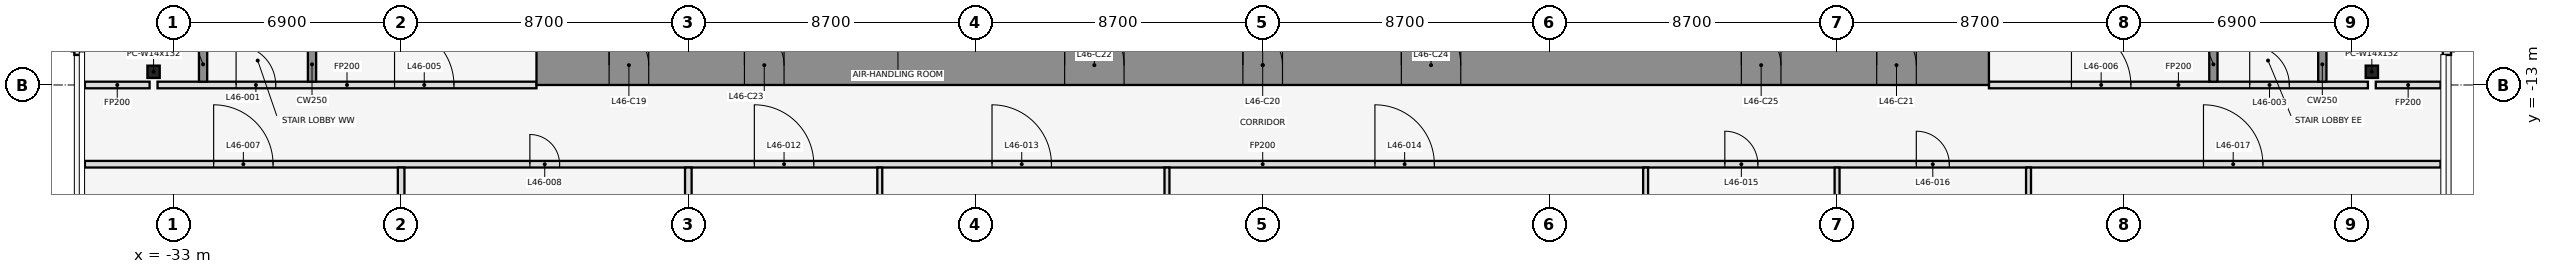
"""IFC4 building model, lengths in metres.
Left out: names, types, materials, properties, quantities, classifications, styles, units other than length and angle.
Written with IfcOpenShell. Run it as: python <this file> out.ifc"""

import sys

from ifc_helpers import new_model, si_unit, direction, frame, frame_2d, origin, origin_2d, place, context, subcontext, project, spatial, rectangle, i_section, extrude, element, fill, save


model = new_model("IFC4")
c1 = context("Model", 3, precision=1e-05, world=origin(), true_north=direction((0.0, 1.0)))
c2 = subcontext(c1, "Body", "Model", "MODEL_VIEW")
j1 = project(units=[si_unit("LENGTHUNIT", "METRE"), si_unit("PLANEANGLEUNIT", "RADIAN")], contexts=[c1])
p1 = place(None, origin())
s1 = spatial("IfcSite", under=j1, at=p1, CompositionType="ELEMENT")
p2 = place(p1, origin())
s2 = spatial("IfcBuilding", under=s1, at=p2, CompositionType="ELEMENT")
p3 = place(p2, frame((0.0, 0.0, 207.3)))
s3 = spatial("IfcBuildingStorey", under=s2, at=p3, CompositionType="ELEMENT", Elevation=207.3)
for number, where, z_axis, x_axis in (
    (1, (-33.6, -12.6, 0.0), (0.0, 0.0, 1.0), (1.0, 0.0, 0.0)),
    (2, (33.6, -12.6, 0.0), (0.0, 0.0, 1.0), (1.0, 0.0, 0.0)),
):
    element("IfcColumn", number, at=place(p3, frame(where, z_axis=z_axis, x_axis=x_axis)), inside=s3, PredefinedType="COLUMN", context=c2, shape_type="SweptSolid", body=[
        extrude(i_section(OverallWidth=0.373, OverallDepth=0.373, WebThickness=0.016, FlangeThickness=0.026, at=origin_2d()), origin(), (0.0, 0.0, 1.0), 4.1),
    ])
for number, where, z_axis, x_axis in (
    (3, (-35.875, -3.0, 0.0), (0.0, 0.0, 1.0), (0.0, -1.0, 0.0)),
    (4, (35.875, -12.09, 0.0), (0.0, 0.0, 1.0), (0.0, 1.0, 0.0)),
):
    element("IfcWall", number, at=place(p3, frame(where, z_axis=z_axis, x_axis=x_axis)), inside=s3, PredefinedType="STANDARD", context=c2, shape_type="SweptSolid", body=[
        extrude(rectangle(XDim=9.09, YDim=0.25, at=frame_2d((4.545, 0.0))), origin(), (0.0, 0.0, 1.0), 3.95),
    ])
p4 = place(p3, frame((-35.68, -15.4, 0.0), z_axis=(0.0, 0.0, 1.0), x_axis=(1.0, 0.0, 0.0)))
e5 = element("IfcWall", 5, at=p4, inside=s3, PredefinedType="PARTITIONING", context=c2, shape_type="SweptSolid", body=[
    extrude(rectangle(XDim=71.36, YDim=0.2, at=frame_2d((35.68, 0.0))), origin(), (0.0, 0.0, 1.0), 2.84),
])
p5 = place(p4, frame((3.9, 0.0, 0.0)))
e6 = element("IfcOpeningElement", 6, at=p5, cuts=e5, PredefinedType="OPENING", context=c2, shape_type="SweptSolid", body=[
    extrude(rectangle(XDim=1.8, YDim=2.1, at=frame_2d((0.9, 1.05))), frame((0.0, 0.112, 0.0), z_axis=(0.0, -1.0, 0.0), x_axis=(1.0, 0.0, 0.0)), (0.0, 0.0, 1.0), 0.224),
])
p6 = place(p4, frame((13.48, 0.0, 0.0)))
e7 = element("IfcOpeningElement", 7, at=p6, cuts=e5, PredefinedType="OPENING", context=c2, shape_type="SweptSolid", body=[
    extrude(rectangle(XDim=0.9, YDim=2.1, at=frame_2d((0.45, 1.05))), frame((0.0, 0.112, 0.0), z_axis=(0.0, -1.0, 0.0), x_axis=(1.0, 0.0, 0.0)), (0.0, 0.0, 1.0), 0.224),
])
p7 = place(p4, frame((20.28, 0.0, 0.0)))
e8 = element("IfcOpeningElement", 8, at=p7, cuts=e5, PredefinedType="OPENING", context=c2, shape_type="SweptSolid", body=[
    extrude(rectangle(XDim=1.8, YDim=2.1, at=frame_2d((0.9, 1.05))), frame((0.0, 0.112, 0.0), z_axis=(0.0, -1.0, 0.0), x_axis=(1.0, 0.0, 0.0)), (0.0, 0.0, 1.0), 0.224),
])
p8 = place(p4, frame((27.48, 0.0, 0.0)))
e9 = element("IfcOpeningElement", 9, at=p8, cuts=e5, PredefinedType="OPENING", context=c2, shape_type="SweptSolid", body=[
    extrude(rectangle(XDim=1.8, YDim=2.1, at=frame_2d((0.9, 1.05))), frame((0.0, 0.112, 0.0), z_axis=(0.0, -1.0, 0.0), x_axis=(1.0, 0.0, 0.0)), (0.0, 0.0, 1.0), 0.224),
])
p9 = place(p4, frame((39.08, 0.0, 0.0)))
e10 = element("IfcOpeningElement", 10, at=p9, cuts=e5, PredefinedType="OPENING", context=c2, shape_type="SweptSolid", body=[
    extrude(rectangle(XDim=1.8, YDim=2.1, at=frame_2d((0.9, 1.05))), frame((0.0, 0.112, 0.0), z_axis=(0.0, -1.0, 0.0), x_axis=(1.0, 0.0, 0.0)), (0.0, 0.0, 1.0), 0.224),
])
p10 = place(p4, frame((49.68, 0.0, 0.0)))
e11 = element("IfcOpeningElement", 11, at=p10, cuts=e5, PredefinedType="OPENING", context=c2, shape_type="SweptSolid", body=[
    extrude(rectangle(XDim=1.0, YDim=2.1, at=frame_2d((0.5, 1.05))), frame((0.0, 0.112, 0.0), z_axis=(0.0, -1.0, 0.0), x_axis=(1.0, 0.0, 0.0)), (0.0, 0.0, 1.0), 0.224),
])
p11 = place(p4, frame((55.48, 0.0, 0.0)))
e12 = element("IfcOpeningElement", 12, at=p11, cuts=e5, PredefinedType="OPENING", context=c2, shape_type="SweptSolid", body=[
    extrude(rectangle(XDim=1.0, YDim=2.1, at=frame_2d((0.5, 1.05))), frame((0.0, 0.112, 0.0), z_axis=(0.0, -1.0, 0.0), x_axis=(1.0, 0.0, 0.0)), (0.0, 0.0, 1.0), 0.224),
])
p12 = place(p4, frame((64.18, 0.0, 0.0)))
e13 = element("IfcOpeningElement", 13, at=p12, cuts=e5, PredefinedType="OPENING", context=c2, shape_type="SweptSolid", body=[
    extrude(rectangle(XDim=1.8, YDim=2.1, at=frame_2d((0.9, 1.05))), frame((0.0, 0.112, 0.0), z_axis=(0.0, -1.0, 0.0), x_axis=(1.0, 0.0, 0.0)), (0.0, 0.0, 1.0), 0.224),
])
p13 = place(p3, frame((-35.68, -13.0, 0.0), z_axis=(0.0, 0.0, 1.0), x_axis=(1.0, 0.0, 0.0)))
e14 = element("IfcWall", 14, at=p13, inside=s3, PredefinedType="PARTITIONING", context=c2, shape_type="SweptSolid", body=[
    extrude(rectangle(XDim=1.96, YDim=0.2, at=frame_2d((0.98, 0.0))), origin(), (0.0, 0.0, 1.0), 2.84),
])
p14 = place(p3, frame((-33.48, -13.0, 0.0), z_axis=(0.0, 0.0, 1.0), x_axis=(1.0, 0.0, 0.0)))
e15 = element("IfcWall", 15, at=p14, inside=s3, PredefinedType="PARTITIONING", context=c2, shape_type="SweptSolid", body=[
    extrude(rectangle(XDim=11.48, YDim=0.2, at=frame_2d((5.74, 0.0))), origin(), (0.0, 0.0, 1.0), 2.84),
])
p15 = place(p14, frame((2.38, 0.0, 0.0)))
e16 = element("IfcOpeningElement", 16, at=p15, cuts=e15, PredefinedType="OPENING", context=c2, shape_type="SweptSolid", body=[
    extrude(rectangle(XDim=1.2, YDim=2.1, at=frame_2d((0.6, 1.05))), frame((0.0, 0.112, 0.0), z_axis=(0.0, -1.0, 0.0), x_axis=(1.0, 0.0, 0.0)), (0.0, 0.0, 1.0), 0.224),
])
p16 = place(p14, frame((7.18, 0.0, 0.0)))
e17 = element("IfcOpeningElement", 17, at=p16, cuts=e15, PredefinedType="OPENING", context=c2, shape_type="SweptSolid", body=[
    extrude(rectangle(XDim=1.8, YDim=2.1, at=frame_2d((0.9, 1.05))), frame((0.0, 0.112, 0.0), z_axis=(0.0, -1.0, 0.0), x_axis=(1.0, 0.0, 0.0)), (0.0, 0.0, 1.0), 0.224),
])
p17 = place(p3, frame((22.0, -13.0, 0.0), z_axis=(0.0, 0.0, 1.0), x_axis=(1.0, 0.0, 0.0)))
e18 = element("IfcWall", 18, at=p17, inside=s3, PredefinedType="PARTITIONING", context=c2, shape_type="SweptSolid", body=[
    extrude(rectangle(XDim=11.48, YDim=0.2, at=frame_2d((5.74, 0.0))), origin(), (0.0, 0.0, 1.0), 2.84),
])
p18 = place(p17, frame((7.9, 0.0, 0.0)))
e19 = element("IfcOpeningElement", 19, at=p18, cuts=e18, PredefinedType="OPENING", context=c2, shape_type="SweptSolid", body=[
    extrude(rectangle(XDim=1.2, YDim=2.1, at=frame_2d((0.6, 1.05))), frame((0.0, 0.112, 0.0), z_axis=(0.0, -1.0, 0.0), x_axis=(1.0, 0.0, 0.0)), (0.0, 0.0, 1.0), 0.224),
])
p19 = place(p17, frame((2.5, 0.0, 0.0)))
e20 = element("IfcOpeningElement", 20, at=p19, cuts=e18, PredefinedType="OPENING", context=c2, shape_type="SweptSolid", body=[
    extrude(rectangle(XDim=1.8, YDim=2.1, at=frame_2d((0.9, 1.05))), frame((0.0, 0.112, 0.0), z_axis=(0.0, -1.0, 0.0), x_axis=(1.0, 0.0, 0.0)), (0.0, 0.0, 1.0), 0.224),
])
p20 = place(p3, frame((33.72, -13.0, 0.0), z_axis=(0.0, 0.0, 1.0), x_axis=(1.0, 0.0, 0.0)))
e21 = element("IfcWall", 21, at=p20, inside=s3, PredefinedType="PARTITIONING", context=c2, shape_type="SweptSolid", body=[
    extrude(rectangle(XDim=1.96, YDim=0.2, at=frame_2d((0.98, 0.0))), origin(), (0.0, 0.0, 1.0), 2.84),
])
for number, where, z_axis, x_axis in (
    (22, (-32.1, -12.9, 0.0), (0.0, 0.0, 1.0), (0.0, 1.0, 0.0)),
    (23, (-28.8, -12.9, 0.0), (0.0, 0.0, 1.0), (0.0, 1.0, 0.0)),
):
    element("IfcWall", number, at=place(p3, frame(where, z_axis=z_axis, x_axis=x_axis)), inside=s3, PredefinedType="SHEAR", context=c2, shape_type="SweptSolid", body=[
        extrude(rectangle(XDim=1.05, YDim=0.25, at=frame_2d((0.525, 0.0))), origin(), (0.0, 0.0, 1.0), 4.1),
    ])
p21 = place(p3, frame((-26.1, -32.03, 0.0), z_axis=(0.0, 0.0, 1.0), x_axis=(0.0, 1.0, 0.0)))
e24 = element("IfcWall", 24, at=p21, inside=s3, PredefinedType="PARTITIONING", context=c2, shape_type="SweptSolid", body=[
    extrude(rectangle(XDim=16.53, YDim=0.2, at=frame_2d((8.265, 0.0))), origin(), (0.0, 0.0, 1.0), 2.84),
])
p22 = place(p3, frame((-17.4, -21.725, 0.0), z_axis=(0.0, 0.0, 1.0), x_axis=(0.0, 1.0, 0.0)))
e25 = element("IfcWall", 25, at=p22, inside=s3, PredefinedType="PARTITIONING", context=c2, shape_type="SweptSolid", body=[
    extrude(rectangle(XDim=6.225, YDim=0.2, at=frame_2d((3.113, 0.0))), origin(), (0.0, 0.0, 1.0), 2.84),
])
p23 = place(p3, frame((-11.6, -31.927, 0.0), z_axis=(0.0, 0.0, 1.0), x_axis=(0.0, 1.0, 0.0)))
e26 = element("IfcWall", 26, at=p23, inside=s3, PredefinedType="PARTITIONING", context=c2, shape_type="SweptSolid", body=[
    extrude(rectangle(XDim=16.427, YDim=0.15, at=frame_2d((8.213, 0.0))), origin(), (0.0, 0.0, 1.0), 2.84),
])
p24 = place(p3, frame((-2.9, -33.71, 0.0), z_axis=(0.0, 0.0, 1.0), x_axis=(0.0, 1.0, 0.0)))
e27 = element("IfcWall", 27, at=p24, inside=s3, PredefinedType="PARTITIONING", context=c2, shape_type="SweptSolid", body=[
    extrude(rectangle(XDim=18.21, YDim=0.15, at=frame_2d((9.105, 0.0))), origin(), (0.0, 0.0, 1.0), 2.84),
])
p25 = place(p3, frame((11.6, -31.927, 0.0), z_axis=(0.0, 0.0, 1.0), x_axis=(0.0, 1.0, 0.0)))
e28 = element("IfcWall", 28, at=p25, inside=s3, PredefinedType="PARTITIONING", context=c2, shape_type="SweptSolid", body=[
    extrude(rectangle(XDim=16.427, YDim=0.15, at=frame_2d((8.213, 0.0))), origin(), (0.0, 0.0, 1.0), 2.84),
])
p26 = place(p3, frame((17.4, -29.352, 0.0), z_axis=(0.0, 0.0, 1.0), x_axis=(0.0, 1.0, 0.0)))
e29 = element("IfcWall", 29, at=p26, inside=s3, PredefinedType="PARTITIONING", context=c2, shape_type="SweptSolid", body=[
    extrude(rectangle(XDim=13.852, YDim=0.15, at=frame_2d((6.926, 0.0))), origin(), (0.0, 0.0, 1.0), 2.84),
])
p27 = place(p3, frame((23.2, -32.03, 0.0), z_axis=(0.0, 0.0, 1.0), x_axis=(0.0, 1.0, 0.0)))
e30 = element("IfcWall", 30, at=p27, inside=s3, PredefinedType="PARTITIONING", context=c2, shape_type="SweptSolid", body=[
    extrude(rectangle(XDim=16.53, YDim=0.15, at=frame_2d((8.265, 0.0))), origin(), (0.0, 0.0, 1.0), 2.84),
])
for number, where, z_axis, x_axis in (
    (31, (28.8, -12.9, 0.0), (0.0, 0.0, 1.0), (0.0, 1.0, 0.0)),
    (32, (32.1, -12.9, 0.0), (0.0, 0.0, 1.0), (0.0, 1.0, 0.0)),
):
    element("IfcWall", number, at=place(p3, frame(where, z_axis=z_axis, x_axis=x_axis)), inside=s3, PredefinedType="SHEAR", context=c2, shape_type="SweptSolid", body=[
        extrude(rectangle(XDim=1.05, YDim=0.25, at=frame_2d((0.525, 0.0))), origin(), (0.0, 0.0, 1.0), 4.1),
    ])
p28 = place(p3, frame((-22.0, -12.4, 0.0), z_axis=(0.0, 0.0, 1.0), x_axis=(1.0, 0.0, 0.0)))
e33 = element("IfcWall", 33, at=p28, inside=s3, PredefinedType="SHEAR", context=c2, shape_type="SweptSolid", body=[
    extrude(rectangle(XDim=44.0, YDim=1.2, at=frame_2d((22.0, 0.0))), origin(), (0.0, 0.0, 1.0), 4.1),
])
p29 = place(p28, frame((2.2, 0.0, 0.0)))
e34 = element("IfcOpeningElement", 34, at=p29, cuts=e33, PredefinedType="OPENING", context=c2, shape_type="SweptSolid", body=[
    extrude(rectangle(XDim=1.2, YDim=2.1, at=frame_2d((0.6, 1.05))), frame((0.0, 0.612, 0.0), z_axis=(0.0, -1.0, 0.0), x_axis=(1.0, 0.0, 0.0)), (0.0, 0.0, 1.0), 1.224),
])
p30 = place(p28, frame((21.4, 0.0, 0.0)))
e35 = element("IfcOpeningElement", 35, at=p30, cuts=e33, PredefinedType="OPENING", context=c2, shape_type="SweptSolid", body=[
    extrude(rectangle(XDim=1.2, YDim=2.1, at=frame_2d((0.6, 1.05))), frame((0.0, 0.612, 0.0), z_axis=(0.0, -1.0, 0.0), x_axis=(1.0, 0.0, 0.0)), (0.0, 0.0, 1.0), 1.224),
])
p31 = place(p28, frame((40.6, 0.0, 0.0)))
e36 = element("IfcOpeningElement", 36, at=p31, cuts=e33, PredefinedType="OPENING", context=c2, shape_type="SweptSolid", body=[
    extrude(rectangle(XDim=1.2, YDim=2.1, at=frame_2d((0.6, 1.05))), frame((0.0, 0.612, 0.0), z_axis=(0.0, -1.0, 0.0), x_axis=(1.0, 0.0, 0.0)), (0.0, 0.0, 1.0), 1.224),
])
p32 = place(p28, frame((16.0, 0.0, 0.0)))
e37 = element("IfcOpeningElement", 37, at=p32, cuts=e33, PredefinedType="OPENING", context=c2, shape_type="SweptSolid", body=[
    extrude(rectangle(XDim=1.8, YDim=2.1, at=frame_2d((0.9, 1.05))), frame((0.0, 0.612, 0.0), z_axis=(0.0, -1.0, 0.0), x_axis=(1.0, 0.0, 0.0)), (0.0, 0.0, 1.0), 1.224),
])
p33 = place(p28, frame((6.3, 0.0, 0.0)))
e38 = element("IfcOpeningElement", 38, at=p33, cuts=e33, PredefinedType="OPENING", context=c2, shape_type="SweptSolid", body=[
    extrude(rectangle(XDim=1.2, YDim=2.1, at=frame_2d((0.6, 1.05))), frame((0.0, 0.612, 0.0), z_axis=(0.0, -1.0, 0.0), x_axis=(1.0, 0.0, 0.0)), (0.0, 0.0, 1.0), 1.224),
])
p34 = place(p28, frame((26.2, 0.0, 0.0)))
e39 = element("IfcOpeningElement", 39, at=p34, cuts=e33, PredefinedType="OPENING", context=c2, shape_type="SweptSolid", body=[
    extrude(rectangle(XDim=1.8, YDim=2.1, at=frame_2d((0.9, 1.05))), frame((0.0, 0.612, 0.0), z_axis=(0.0, -1.0, 0.0), x_axis=(1.0, 0.0, 0.0)), (0.0, 0.0, 1.0), 1.224),
])
p35 = place(p28, frame((36.5, 0.0, 0.0)))
e40 = element("IfcOpeningElement", 40, at=p35, cuts=e33, PredefinedType="OPENING", context=c2, shape_type="SweptSolid", body=[
    extrude(rectangle(XDim=1.2, YDim=2.1, at=frame_2d((0.6, 1.05))), frame((0.0, 0.612, 0.0), z_axis=(0.0, -1.0, 0.0), x_axis=(1.0, 0.0, 0.0)), (0.0, 0.0, 1.0), 1.224),
])
p36 = place(p15, origin())
e41 = element("IfcDoor", 41, at=p36, inside=s3, OperationType="SINGLE_SWING_LEFT", PredefinedType="DOOR", context=c2, shape_type="SweptSolid", body=[
    extrude(rectangle(XDim=1.2, YDim=2.1, at=frame_2d((0.6, 1.05))), frame((0.0, 0.025, 0.0), z_axis=(0.0, -1.0, 0.0), x_axis=(1.0, 0.0, 0.0)), (0.0, 0.0, 1.0), 0.05),
])
fill(e16, e41)
p37 = place(p18, origin())
e42 = element("IfcDoor", 42, at=p37, inside=s3, OperationType="SINGLE_SWING_RIGHT", PredefinedType="DOOR", context=c2, shape_type="SweptSolid", body=[
    extrude(rectangle(XDim=1.2, YDim=2.1, at=frame_2d((0.6, 1.05))), frame((0.0, 0.025, 0.0), z_axis=(0.0, -1.0, 0.0), x_axis=(1.0, 0.0, 0.0)), (0.0, 0.0, 1.0), 0.05),
])
fill(e19, e42)
p38 = place(p16, origin())
e43 = element("IfcDoor", 43, at=p38, inside=s3, OperationType="SINGLE_SWING_LEFT", PredefinedType="DOOR", context=c2, shape_type="SweptSolid", body=[
    extrude(rectangle(XDim=1.8, YDim=2.1, at=frame_2d((0.9, 1.05))), frame((0.0, 0.025, 0.0), z_axis=(0.0, -1.0, 0.0), x_axis=(1.0, 0.0, 0.0)), (0.0, 0.0, 1.0), 0.05),
])
fill(e17, e43)
p39 = place(p19, origin())
e44 = element("IfcDoor", 44, at=p39, inside=s3, OperationType="SINGLE_SWING_LEFT", PredefinedType="DOOR", context=c2, shape_type="SweptSolid", body=[
    extrude(rectangle(XDim=1.8, YDim=2.1, at=frame_2d((0.9, 1.05))), frame((0.0, 0.025, 0.0), z_axis=(0.0, -1.0, 0.0), x_axis=(1.0, 0.0, 0.0)), (0.0, 0.0, 1.0), 0.05),
])
fill(e20, e44)
p40 = place(p5, origin())
e45 = element("IfcDoor", 45, at=p40, inside=s3, OperationType="SINGLE_SWING_LEFT", PredefinedType="DOOR", context=c2, shape_type="SweptSolid", body=[
    extrude(rectangle(XDim=1.8, YDim=2.1, at=frame_2d((0.9, 1.05))), frame((0.0, 0.025, 0.0), z_axis=(0.0, -1.0, 0.0), x_axis=(1.0, 0.0, 0.0)), (0.0, 0.0, 1.0), 0.05),
])
fill(e6, e45)
p41 = place(p6, frame((0.9, 0.0, 0.0), z_axis=(0.0, 0.0, 1.0), x_axis=(-1.0, 0.0, 0.0)))
e46 = element("IfcDoor", 46, at=p41, inside=s3, OperationType="SINGLE_SWING_RIGHT", PredefinedType="DOOR", context=c2, shape_type="SweptSolid", body=[
    extrude(rectangle(XDim=0.9, YDim=2.1, at=frame_2d((0.45, 1.05))), frame((0.0, 0.025, 0.0), z_axis=(0.0, -1.0, 0.0), x_axis=(1.0, 0.0, 0.0)), (0.0, 0.0, 1.0), 0.05),
])
fill(e7, e46)
p42 = place(p7, origin())
e47 = element("IfcDoor", 47, at=p42, inside=s3, OperationType="SINGLE_SWING_LEFT", PredefinedType="DOOR", context=c2, shape_type="SweptSolid", body=[
    extrude(rectangle(XDim=1.8, YDim=2.1, at=frame_2d((0.9, 1.05))), frame((0.0, 0.025, 0.0), z_axis=(0.0, -1.0, 0.0), x_axis=(1.0, 0.0, 0.0)), (0.0, 0.0, 1.0), 0.05),
])
fill(e8, e47)
p43 = place(p8, origin())
e48 = element("IfcDoor", 48, at=p43, inside=s3, OperationType="SINGLE_SWING_LEFT", PredefinedType="DOOR", context=c2, shape_type="SweptSolid", body=[
    extrude(rectangle(XDim=1.8, YDim=2.1, at=frame_2d((0.9, 1.05))), frame((0.0, 0.025, 0.0), z_axis=(0.0, -1.0, 0.0), x_axis=(1.0, 0.0, 0.0)), (0.0, 0.0, 1.0), 0.05),
])
fill(e9, e48)
p44 = place(p9, origin())
e49 = element("IfcDoor", 49, at=p44, inside=s3, OperationType="SINGLE_SWING_LEFT", PredefinedType="DOOR", context=c2, shape_type="SweptSolid", body=[
    extrude(rectangle(XDim=1.8, YDim=2.1, at=frame_2d((0.9, 1.05))), frame((0.0, 0.025, 0.0), z_axis=(0.0, -1.0, 0.0), x_axis=(1.0, 0.0, 0.0)), (0.0, 0.0, 1.0), 0.05),
])
fill(e10, e49)
p45 = place(p10, frame((1.0, 0.0, 0.0), z_axis=(0.0, 0.0, 1.0), x_axis=(-1.0, 0.0, 0.0)))
e50 = element("IfcDoor", 50, at=p45, inside=s3, OperationType="SINGLE_SWING_RIGHT", PredefinedType="DOOR", context=c2, shape_type="SweptSolid", body=[
    extrude(rectangle(XDim=1.0, YDim=2.1, at=frame_2d((0.5, 1.05))), frame((0.0, 0.025, 0.0), z_axis=(0.0, -1.0, 0.0), x_axis=(1.0, 0.0, 0.0)), (0.0, 0.0, 1.0), 0.05),
])
fill(e11, e50)
p46 = place(p11, frame((1.0, 0.0, 0.0), z_axis=(0.0, 0.0, 1.0), x_axis=(-1.0, 0.0, 0.0)))
e51 = element("IfcDoor", 51, at=p46, inside=s3, OperationType="SINGLE_SWING_LEFT", PredefinedType="DOOR", context=c2, shape_type="SweptSolid", body=[
    extrude(rectangle(XDim=1.0, YDim=2.1, at=frame_2d((0.5, 1.05))), frame((0.0, 0.025, 0.0), z_axis=(0.0, -1.0, 0.0), x_axis=(1.0, 0.0, 0.0)), (0.0, 0.0, 1.0), 0.05),
])
fill(e12, e51)
p47 = place(p12, origin())
e52 = element("IfcDoor", 52, at=p47, inside=s3, OperationType="SINGLE_SWING_LEFT", PredefinedType="DOOR", context=c2, shape_type="SweptSolid", body=[
    extrude(rectangle(XDim=1.8, YDim=2.1, at=frame_2d((0.9, 1.05))), frame((0.0, 0.025, 0.0), z_axis=(0.0, -1.0, 0.0), x_axis=(1.0, 0.0, 0.0)), (0.0, 0.0, 1.0), 0.05),
])
fill(e13, e52)
p48 = place(p29, frame((1.2, 0.0, 0.0), z_axis=(0.0, 0.0, 1.0), x_axis=(-1.0, 0.0, 0.0)))
e53 = element("IfcDoor", 53, at=p48, inside=s3, OperationType="SINGLE_SWING_RIGHT", PredefinedType="DOOR", context=c2, shape_type="SweptSolid", body=[
    extrude(rectangle(XDim=1.2, YDim=2.1, at=frame_2d((0.6, 1.05))), frame((0.0, 0.025, 0.0), z_axis=(0.0, -1.0, 0.0), x_axis=(1.0, 0.0, 0.0)), (0.0, 0.0, 1.0), 0.05),
])
fill(e34, e53)
p49 = place(p30, frame((1.2, 0.0, 0.0), z_axis=(0.0, 0.0, 1.0), x_axis=(-1.0, 0.0, 0.0)))
e54 = element("IfcDoor", 54, at=p49, inside=s3, OperationType="SINGLE_SWING_RIGHT", PredefinedType="DOOR", context=c2, shape_type="SweptSolid", body=[
    extrude(rectangle(XDim=1.2, YDim=2.1, at=frame_2d((0.6, 1.05))), frame((0.0, 0.025, 0.0), z_axis=(0.0, -1.0, 0.0), x_axis=(1.0, 0.0, 0.0)), (0.0, 0.0, 1.0), 0.05),
])
fill(e35, e54)
p50 = place(p31, frame((1.2, 0.0, 0.0), z_axis=(0.0, 0.0, 1.0), x_axis=(-1.0, 0.0, 0.0)))
e55 = element("IfcDoor", 55, at=p50, inside=s3, OperationType="SINGLE_SWING_RIGHT", PredefinedType="DOOR", context=c2, shape_type="SweptSolid", body=[
    extrude(rectangle(XDim=1.2, YDim=2.1, at=frame_2d((0.6, 1.05))), frame((0.0, 0.025, 0.0), z_axis=(0.0, -1.0, 0.0), x_axis=(1.0, 0.0, 0.0)), (0.0, 0.0, 1.0), 0.05),
])
fill(e36, e55)
p51 = place(p32, origin())
e56 = element("IfcDoor", 56, at=p51, inside=s3, OperationType="SINGLE_SWING_LEFT", PredefinedType="DOOR", context=c2, shape_type="SweptSolid", body=[
    extrude(rectangle(XDim=1.8, YDim=2.1, at=frame_2d((0.9, 1.05))), frame((0.0, 0.025, 0.0), z_axis=(0.0, -1.0, 0.0), x_axis=(1.0, 0.0, 0.0)), (0.0, 0.0, 1.0), 0.05),
])
fill(e37, e56)
p52 = place(p33, frame((1.2, 0.0, 0.0), z_axis=(0.0, 0.0, 1.0), x_axis=(-1.0, 0.0, 0.0)))
e57 = element("IfcDoor", 57, at=p52, inside=s3, OperationType="SINGLE_SWING_RIGHT", PredefinedType="DOOR", context=c2, shape_type="SweptSolid", body=[
    extrude(rectangle(XDim=1.2, YDim=2.1, at=frame_2d((0.6, 1.05))), frame((0.0, 0.025, 0.0), z_axis=(0.0, -1.0, 0.0), x_axis=(1.0, 0.0, 0.0)), (0.0, 0.0, 1.0), 0.05),
])
fill(e38, e57)
p53 = place(p34, origin())
e58 = element("IfcDoor", 58, at=p53, inside=s3, OperationType="SINGLE_SWING_LEFT", PredefinedType="DOOR", context=c2, shape_type="SweptSolid", body=[
    extrude(rectangle(XDim=1.8, YDim=2.1, at=frame_2d((0.9, 1.05))), frame((0.0, 0.025, 0.0), z_axis=(0.0, -1.0, 0.0), x_axis=(1.0, 0.0, 0.0)), (0.0, 0.0, 1.0), 0.05),
])
fill(e39, e58)
p54 = place(p35, frame((1.2, 0.0, 0.0), z_axis=(0.0, 0.0, 1.0), x_axis=(-1.0, 0.0, 0.0)))
e59 = element("IfcDoor", 59, at=p54, inside=s3, OperationType="SINGLE_SWING_RIGHT", PredefinedType="DOOR", context=c2, shape_type="SweptSolid", body=[
    extrude(rectangle(XDim=1.2, YDim=2.1, at=frame_2d((0.6, 1.05))), frame((0.0, 0.025, 0.0), z_axis=(0.0, -1.0, 0.0), x_axis=(1.0, 0.0, 0.0)), (0.0, 0.0, 1.0), 0.05),
])
fill(e40, e59)
save(model, sys.argv[1])
